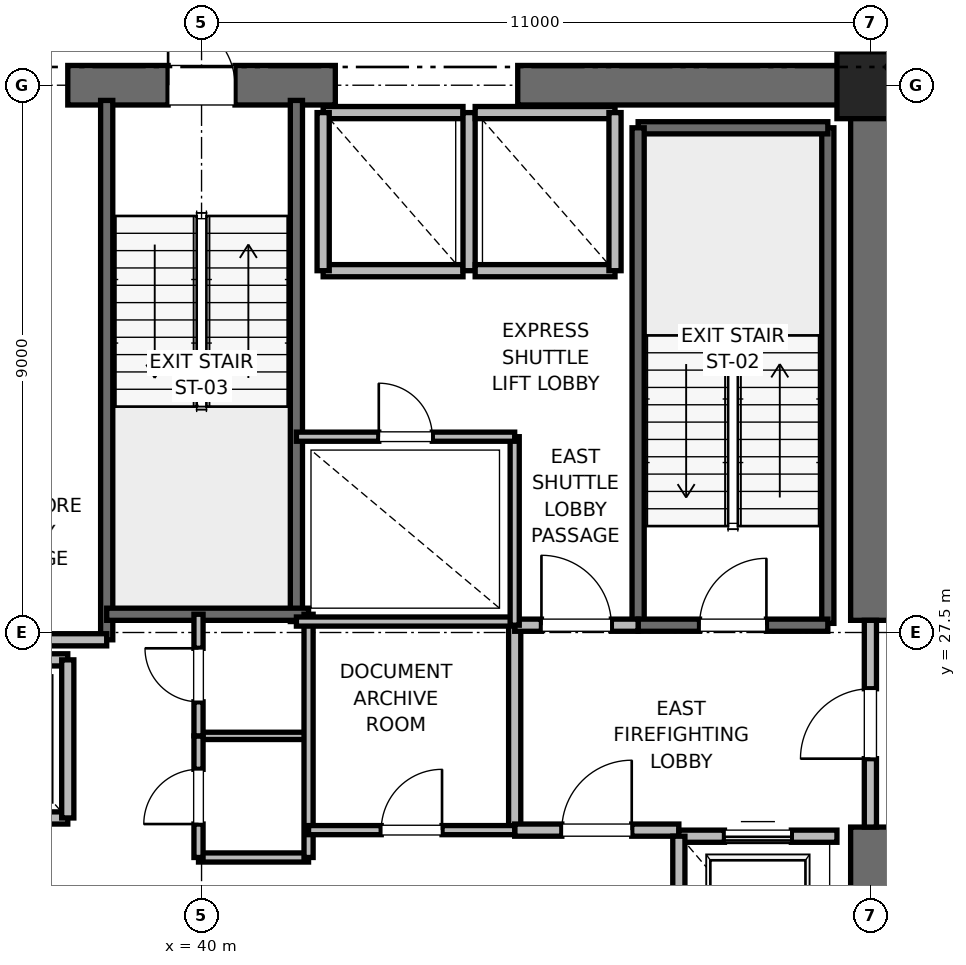
"""IFC4 building model, lengths in metres.
Left out: names, types, materials, properties, quantities, classifications, styles, units other than length and angle.
Written with IfcOpenShell. Run it as: python <this file> out.ifc"""

import sys

from ifc_helpers import new_model, si_unit, direction, frame, frame_2d, origin, origin_2d, place, context, subcontext, project, spatial, rectangle, extrude, element, fill, save


model = new_model("IFC4")
c1 = context("Model", 3, precision=1e-05, world=origin(), true_north=direction((0.0, 1.0)))
c2 = subcontext(c1, "Body", "Model", "MODEL_VIEW")
j1 = project(units=[si_unit("LENGTHUNIT", "METRE"), si_unit("PLANEANGLEUNIT", "RADIAN")], contexts=[c1])
p1 = place(None, origin())
s1 = spatial("IfcSite", under=j1, at=p1, CompositionType="ELEMENT")
p2 = place(p1, origin())
s2 = spatial("IfcBuilding", under=s1, at=p2, CompositionType="ELEMENT")
p3 = place(p2, frame((0.0, 0.0, 67.6)))
s3 = spatial("IfcBuildingStorey", under=s2, at=p3, CompositionType="ELEMENT", Elevation=67.6)
p4 = place(p3, frame((51.0, 36.5, 0.0), z_axis=(0.0, 0.0, 1.0), x_axis=(1.0, 0.0, 0.0)))
e1 = element("IfcColumn", 1, at=p4, inside=s3, PredefinedType="PILASTER", context=c2, shape_type="SweptSolid", body=[
    extrude(rectangle(XDim=1.1, YDim=1.1, at=origin_2d()), origin(), (0.0, 0.0, 1.0), 4.0),
])
p5 = place(p3, frame((37.8, 36.5, 0.0), z_axis=(0.0, 0.0, 1.0), x_axis=(1.0, 0.0, 0.0)))
e2 = element("IfcWall", 2, at=p5, inside=s3, PredefinedType="SHEAR", context=c2, shape_type="SweptSolid", body=[
    extrude(rectangle(XDim=4.4, YDim=0.65, at=frame_2d((2.2, 0.0))), origin(), (0.0, 0.0, 1.0), 3.76),
])
p6 = place(p5, frame((1.65, 0.0, 0.0)))
e3 = element("IfcOpeningElement", 3, at=p6, cuts=e2, PredefinedType="OPENING", context=c2, shape_type="SweptSolid", body=[
    extrude(rectangle(XDim=1.1, YDim=2.15, at=frame_2d((0.55, 1.075))), frame((0.0, 0.325, 0.0), z_axis=(0.0, -1.0, 0.0), x_axis=(1.0, 0.0, 0.0)), (0.0, 0.0, 1.0), 0.65),
])
for number, where, z_axis, x_axis in (
    (4, (45.2, 36.5, 0.0), (0.0, 0.0, 1.0), (1.0, 0.0, 0.0)),
    (5, (51.0, 18.5, 0.0), (0.0, 0.0, 1.0), (0.0, 1.0, 0.0)),
):
    element("IfcWall", number, at=place(p3, frame(where, z_axis=z_axis, x_axis=x_axis)), inside=s3, PredefinedType="SHEAR", context=c2, shape_type="SweptSolid", body=[
        extrude(rectangle(XDim=5.8, YDim=0.65, at=frame_2d((2.9, 0.0))), origin(), (0.0, 0.0, 1.0), 3.76),
    ])
p7 = place(p3, frame((51.0, 27.7, 0.0), z_axis=(0.0, 0.0, 1.0), x_axis=(0.0, 1.0, 0.0)))
e6 = element("IfcWall", 6, at=p7, inside=s3, PredefinedType="SHEAR", context=c2, shape_type="SweptSolid", body=[
    extrude(rectangle(XDim=8.8, YDim=0.65, at=frame_2d((4.4, 0.0))), origin(), (0.0, 0.0, 1.0), 3.76),
])
p8 = place(p3, frame((50.3, 27.65, 0.0), z_axis=(0.0, 0.0, 1.0), x_axis=(0.0, 1.0, 0.0)))
e7 = element("IfcWall", 7, at=p8, inside=s3, PredefinedType="SOLIDWALL", context=c2, shape_type="SweptSolid", body=[
    extrude(rectangle(XDim=8.15, YDim=0.2, at=frame_2d((4.075, 0.0))), origin(), (0.0, 0.0, 1.0), 3.76),
])
p9 = place(p3, frame((47.18, 35.8, 0.0), z_axis=(0.0, 0.0, 1.0), x_axis=(1.0, 0.0, 0.0)))
e8 = element("IfcWall", 8, at=p9, inside=s3, PredefinedType="SOLIDWALL", context=c2, shape_type="SweptSolid", body=[
    extrude(rectangle(XDim=3.12, YDim=0.2, at=frame_2d((1.56, 0.0))), origin(), (0.0, 0.0, 1.0), 3.76),
])
p10 = place(p3, frame((47.18, 27.62, 0.0), z_axis=(0.0, 0.0, 1.0), x_axis=(0.0, 1.0, 0.0)))
e9 = element("IfcWall", 9, at=p10, inside=s3, PredefinedType="SOLIDWALL", context=c2, shape_type="SweptSolid", body=[
    extrude(rectangle(XDim=8.18, YDim=0.2, at=frame_2d((4.09, 0.0))), origin(), (0.0, 0.0, 1.0), 3.76),
])
p11 = place(p3, frame((47.18, 27.62, 0.0), z_axis=(0.0, 0.0, 1.0), x_axis=(1.0, 0.0, 0.0)))
e10 = element("IfcWall", 10, at=p11, inside=s3, PredefinedType="SOLIDWALL", context=c2, shape_type="SweptSolid", body=[
    extrude(rectangle(XDim=3.12, YDim=0.2, at=frame_2d((1.56, 0.0))), origin(), (0.0, 0.0, 1.0), 3.76),
])
p12 = place(p11, frame((1.01, 0.0, 0.0)))
e11 = element("IfcOpeningElement", 11, at=p12, cuts=e10, PredefinedType="OPENING", context=c2, shape_type="SweptSolid", body=[
    extrude(rectangle(XDim=1.1, YDim=2.15, at=frame_2d((0.55, 1.075))), frame((0.0, 0.1, 0.0), z_axis=(0.0, -1.0, 0.0), x_axis=(1.0, 0.0, 0.0)), (0.0, 0.0, 1.0), 0.2),
])
p13 = place(p3, frame((38.44, 27.38, 0.0), z_axis=(0.0, 0.0, 1.0), x_axis=(0.0, 1.0, 0.0)))
e12 = element("IfcWall", 12, at=p13, inside=s3, PredefinedType="SOLIDWALL", context=c2, shape_type="SweptSolid", body=[
    extrude(rectangle(XDim=8.87, YDim=0.2, at=frame_2d((4.435, 0.0))), origin(), (0.0, 0.0, 1.0), 3.76),
])
p14 = place(p3, frame((41.56, 27.68, 0.0), z_axis=(0.0, 0.0, 1.0), x_axis=(0.0, 1.0, 0.0)))
e13 = element("IfcWall", 13, at=p14, inside=s3, PredefinedType="SOLIDWALL", context=c2, shape_type="SweptSolid", body=[
    extrude(rectangle(XDim=8.57, YDim=0.2, at=frame_2d((4.285, 0.0))), origin(), (0.0, 0.0, 1.0), 3.76),
])
p15 = place(p3, frame((38.44, 27.8, 0.0), z_axis=(0.0, 0.0, 1.0), x_axis=(1.0, 0.0, 0.0)))
e14 = element("IfcWall", 14, at=p15, inside=s3, PredefinedType="SOLIDWALL", context=c2, shape_type="SweptSolid", body=[
    extrude(rectangle(XDim=3.32, YDim=0.2, at=frame_2d((1.66, 0.0))), origin(), (0.0, 0.0, 1.0), 3.76),
])
p16 = place(p3, frame((32.82, 27.38, 0.0), z_axis=(0.0, 0.0, 1.0), x_axis=(1.0, 0.0, 0.0)))
e15 = element("IfcWall", 15, at=p16, inside=s3, PredefinedType="PARTITIONING", context=c2, shape_type="SweptSolid", body=[
    extrude(rectangle(XDim=5.62, YDim=0.2, at=frame_2d((2.81, 0.0))), origin(), (0.0, 0.0, 1.0), 3.76),
])
p17 = place(p3, frame((45.15, 24.25, 0.0), z_axis=(0.0, 0.0, 1.0), x_axis=(0.0, 1.0, 0.0)))
e16 = element("IfcWall", 16, at=p17, inside=s3, PredefinedType="PARTITIONING", context=c2, shape_type="SweptSolid", body=[
    extrude(rectangle(XDim=3.37, YDim=0.2, at=frame_2d((1.685, 0.0))), origin(), (0.0, 0.0, 1.0), 3.76),
])
p18 = place(p3, frame((45.15, 24.25, 0.0), z_axis=(0.0, 0.0, 1.0), x_axis=(1.0, 0.0, 0.0)))
e17 = element("IfcWall", 17, at=p18, inside=s3, PredefinedType="PARTITIONING", context=c2, shape_type="SweptSolid", body=[
    extrude(rectangle(XDim=2.7, YDim=0.2, at=frame_2d((1.35, 0.0))), origin(), (0.0, 0.0, 1.0), 3.76),
])
p19 = place(p18, frame((0.775, 0.0, 0.0)))
e18 = element("IfcOpeningElement", 18, at=p19, cuts=e17, PredefinedType="OPENING", context=c2, shape_type="SweptSolid", body=[
    extrude(rectangle(XDim=1.15, YDim=2.2, at=frame_2d((0.575, 1.1))), frame((0.0, 0.1, 0.0), z_axis=(0.0, -1.0, 0.0), x_axis=(1.0, 0.0, 0.0)), (0.0, 0.0, 1.0), 0.2),
])
p20 = place(p3, frame((45.15, 27.62, 0.0), z_axis=(0.0, 0.0, 1.0), x_axis=(1.0, 0.0, 0.0)))
e19 = element("IfcWall", 19, at=p20, inside=s3, PredefinedType="PARTITIONING", context=c2, shape_type="SweptSolid", body=[
    extrude(rectangle(XDim=2.03, YDim=0.2, at=frame_2d((1.015, 0.0))), origin(), (0.0, 0.0, 1.0), 3.76),
])
p21 = place(p20, frame((0.44, 0.0, 0.0)))
e20 = element("IfcOpeningElement", 20, at=p21, cuts=e19, PredefinedType="OPENING", context=c2, shape_type="SweptSolid", body=[
    extrude(rectangle(XDim=1.15, YDim=2.2, at=frame_2d((0.575, 1.1))), frame((0.0, 0.1, 0.0), z_axis=(0.0, -1.0, 0.0), x_axis=(1.0, 0.0, 0.0)), (0.0, 0.0, 1.0), 0.2),
])
p22 = place(p3, frame((51.0, 24.3, 0.0), z_axis=(0.0, 0.0, 1.0), x_axis=(0.0, 1.0, 0.0)))
e21 = element("IfcWall", 21, at=p22, inside=s3, PredefinedType="PARTITIONING", context=c2, shape_type="SweptSolid", body=[
    extrude(rectangle(XDim=3.4, YDim=0.2, at=frame_2d((1.7, 0.0))), origin(), (0.0, 0.0, 1.0), 2.54),
])
p23 = place(p22, frame((1.125, 0.0, 0.0)))
e22 = element("IfcOpeningElement", 22, at=p23, cuts=e21, PredefinedType="OPENING", context=c2, shape_type="SweptSolid", body=[
    extrude(rectangle(XDim=1.15, YDim=2.2, at=frame_2d((0.575, 1.1))), frame((0.0, 0.1, 0.0), z_axis=(0.0, -1.0, 0.0), x_axis=(1.0, 0.0, 0.0)), (0.0, 0.0, 1.0), 0.2),
])
p24 = place(p3, frame((50.45, 24.15, 0.0), z_axis=(0.0, 0.0, 1.0), x_axis=(-1.0, 0.0, 0.0)))
e23 = element("IfcWall", 23, at=p24, inside=s3, PredefinedType="SOLIDWALL", context=c2, shape_type="SweptSolid", body=[
    extrude(rectangle(XDim=2.6, YDim=0.2, at=frame_2d((1.3, 0.0))), origin(), (0.0, 0.0, 1.0), 2.54),
])
p25 = place(p24, frame((0.75, 0.0, 0.0)))
e24 = element("IfcOpeningElement", 24, at=p25, cuts=e23, PredefinedType="OPENING", context=c2, shape_type="SweptSolid", body=[
    extrude(rectangle(XDim=1.1, YDim=2.2, at=frame_2d((0.55, 1.1))), frame((0.0, 0.1, 0.0), z_axis=(0.0, -1.0, 0.0), x_axis=(1.0, 0.0, 0.0)), (0.0, 0.0, 1.0), 0.2),
])
p26 = place(p3, frame((47.85, 24.15, 0.0), z_axis=(0.0, 0.0, 1.0), x_axis=(0.0, -1.0, 0.0)))
e25 = element("IfcWall", 25, at=p26, inside=s3, PredefinedType="SOLIDWALL", context=c2, shape_type="SweptSolid", body=[
    extrude(rectangle(XDim=3.0, YDim=0.2, at=frame_2d((1.5, 0.0))), origin(), (0.0, 0.0, 1.0), 3.76),
])
p27 = place(p3, frame((35.5, 24.45, 0.0), z_axis=(0.0, 0.0, 1.0), x_axis=(1.0, 0.0, 0.0)))
e26 = element("IfcWall", 26, at=p27, inside=s3, PredefinedType="SOLIDWALL", context=c2, shape_type="SweptSolid", body=[
    extrude(rectangle(XDim=2.3, YDim=0.2, at=frame_2d((1.15, 0.0))), origin(), (0.0, 0.0, 1.0), 3.76),
])
p28 = place(p27, frame((0.6, 0.0, 0.0)))
e27 = element("IfcOpeningElement", 27, at=p28, cuts=e26, PredefinedType="OPENING", context=c2, shape_type="SweptSolid", body=[
    extrude(rectangle(XDim=1.1, YDim=2.2, at=frame_2d((0.55, 1.1))), frame((0.0, 0.1, 0.0), z_axis=(0.0, -1.0, 0.0), x_axis=(1.0, 0.0, 0.0)), (0.0, 0.0, 1.0), 0.2),
])
p29 = place(p3, frame((37.8, 27.05, 0.0), z_axis=(0.0, 0.0, 1.0), x_axis=(-1.0, 0.0, 0.0)))
e28 = element("IfcWall", 28, at=p29, inside=s3, PredefinedType="SOLIDWALL", context=c2, shape_type="SweptSolid", body=[
    extrude(rectangle(XDim=2.3, YDim=0.2, at=frame_2d((1.15, 0.0))), origin(), (0.0, 0.0, 1.0), 3.76),
])
p30 = place(p3, frame((37.8, 24.45, 0.0), z_axis=(0.0, 0.0, 1.0), x_axis=(0.0, 1.0, 0.0)))
e29 = element("IfcWall", 29, at=p30, inside=s3, PredefinedType="SOLIDWALL", context=c2, shape_type="SweptSolid", body=[
    extrude(rectangle(XDim=2.6, YDim=0.2, at=frame_2d((1.3, 0.0))), origin(), (0.0, 0.0, 1.0), 3.76),
])
p31 = place(p3, frame((42.0, 33.45, 0.0), z_axis=(0.0, 0.0, 1.0), x_axis=(1.0, 0.0, 0.0)))
e30 = element("IfcWall", 30, at=p31, inside=s3, PredefinedType="SOLIDWALL", context=c2, shape_type="SweptSolid", body=[
    extrude(rectangle(XDim=2.3, YDim=0.2, at=frame_2d((1.15, 0.0))), origin(), (0.0, 0.0, 1.0), 3.76),
])
p32 = place(p3, frame((44.3, 36.05, 0.0), z_axis=(0.0, 0.0, 1.0), x_axis=(-1.0, 0.0, 0.0)))
e31 = element("IfcWall", 31, at=p32, inside=s3, PredefinedType="SOLIDWALL", context=c2, shape_type="SweptSolid", body=[
    extrude(rectangle(XDim=2.3, YDim=0.2, at=frame_2d((1.15, 0.0))), origin(), (0.0, 0.0, 1.0), 2.54),
])
for number, where, z_axis, x_axis in (
    (32, (42.0, 36.05, 0.0), (0.0, 0.0, 1.0), (0.0, -1.0, 0.0)),
    (33, (44.4, 33.45, 0.0), (0.0, 0.0, 1.0), (0.0, 1.0, 0.0)),
):
    element("IfcWall", number, at=place(p3, frame(where, z_axis=z_axis, x_axis=x_axis)), inside=s3, PredefinedType="SOLIDWALL", context=c2, shape_type="SweptSolid", body=[
        extrude(rectangle(XDim=2.6, YDim=0.2, at=frame_2d((1.3, 0.0))), origin(), (0.0, 0.0, 1.0), 2.54),
    ])
p33 = place(p3, frame((44.5, 33.45, 0.0), z_axis=(0.0, 0.0, 1.0), x_axis=(1.0, 0.0, 0.0)))
e34 = element("IfcWall", 34, at=p33, inside=s3, PredefinedType="SOLIDWALL", context=c2, shape_type="SweptSolid", body=[
    extrude(rectangle(XDim=2.3, YDim=0.2, at=frame_2d((1.15, 0.0))), origin(), (0.0, 0.0, 1.0), 3.76),
])
p34 = place(p3, frame((46.8, 36.05, 0.0), z_axis=(0.0, 0.0, 1.0), x_axis=(-1.0, 0.0, 0.0)))
e35 = element("IfcWall", 35, at=p34, inside=s3, PredefinedType="SOLIDWALL", context=c2, shape_type="SweptSolid", body=[
    extrude(rectangle(XDim=2.3, YDim=0.2, at=frame_2d((1.15, 0.0))), origin(), (0.0, 0.0, 1.0), 2.54),
])
p35 = place(p3, frame((46.8, 33.45, 0.0), z_axis=(0.0, 0.0, 1.0), x_axis=(0.0, 1.0, 0.0)))
e36 = element("IfcWall", 36, at=p35, inside=s3, PredefinedType="SOLIDWALL", context=c2, shape_type="SweptSolid", body=[
    extrude(rectangle(XDim=2.6, YDim=0.2, at=frame_2d((1.3, 0.0))), origin(), (0.0, 0.0, 1.0), 3.76),
])
p36 = place(p3, frame((39.95, 23.8, 0.0), z_axis=(0.0, 0.0, 1.0), x_axis=(1.0, 0.0, 0.0)))
e37 = element("IfcWall", 37, at=p36, inside=s3, PredefinedType="PARTITIONING", context=c2, shape_type="SweptSolid", body=[
    extrude(rectangle(XDim=1.81, YDim=0.15, at=frame_2d((0.905, 0.0))), origin(), (0.0, 0.0, 1.0), 2.85),
])
p37 = place(p3, frame((39.95, 25.8, 0.0), z_axis=(0.0, 0.0, 1.0), x_axis=(1.0, 0.0, 0.0)))
e38 = element("IfcWall", 38, at=p37, inside=s3, PredefinedType="PARTITIONING", context=c2, shape_type="SweptSolid", body=[
    extrude(rectangle(XDim=1.81, YDim=0.12, at=frame_2d((0.905, 0.0))), origin(), (0.0, 0.0, 1.0), 2.85),
])
p38 = place(p3, frame((41.76, 23.8, 0.0), z_axis=(0.0, 0.0, 1.0), x_axis=(0.0, 1.0, 0.0)))
e39 = element("IfcWall", 39, at=p38, inside=s3, PredefinedType="PARTITIONING", context=c2, shape_type="SweptSolid", body=[
    extrude(rectangle(XDim=4.0, YDim=0.15, at=frame_2d((2.0, 0.0))), origin(), (0.0, 0.0, 1.0), 2.85),
])
p39 = place(p3, frame((39.95, 23.8, 0.0), z_axis=(0.0, 0.0, 1.0), x_axis=(0.0, 1.0, 0.0)))
e40 = element("IfcWall", 40, at=p39, inside=s3, PredefinedType="PARTITIONING", context=c2, shape_type="SweptSolid", body=[
    extrude(rectangle(XDim=2.0, YDim=0.15, at=frame_2d((1.0, 0.0))), origin(), (0.0, 0.0, 1.0), 2.85),
])
p40 = place(p39, frame((0.55, 0.0, 0.0)))
e41 = element("IfcOpeningElement", 41, at=p40, cuts=e40, PredefinedType="OPENING", context=c2, shape_type="SweptSolid", body=[
    extrude(rectangle(XDim=0.9, YDim=2.1, at=frame_2d((0.45, 1.05))), frame((0.0, 0.075, 0.0), z_axis=(0.0, -1.0, 0.0), x_axis=(1.0, 0.0, 0.0)), (0.0, 0.0, 1.0), 0.15),
])
p41 = place(p3, frame((39.95, 25.8, 0.0), z_axis=(0.0, 0.0, 1.0), x_axis=(0.0, 1.0, 0.0)))
e42 = element("IfcWall", 42, at=p41, inside=s3, PredefinedType="PARTITIONING", context=c2, shape_type="SweptSolid", body=[
    extrude(rectangle(XDim=2.0, YDim=0.15, at=frame_2d((1.0, 0.0))), origin(), (0.0, 0.0, 1.0), 2.85),
])
p42 = place(p41, frame((0.56, 0.0, 0.0)))
e43 = element("IfcOpeningElement", 43, at=p42, cuts=e42, PredefinedType="OPENING", context=c2, shape_type="SweptSolid", body=[
    extrude(rectangle(XDim=0.88, YDim=2.1, at=frame_2d((0.44, 1.05))), frame((0.0, 0.075, 0.0), z_axis=(0.0, -1.0, 0.0), x_axis=(1.0, 0.0, 0.0)), (0.0, 0.0, 1.0), 0.15),
])
p43 = place(p3, frame((41.56, 27.68, 0.0), z_axis=(0.0, 0.0, 1.0), x_axis=(1.0, 0.0, 0.0)))
e44 = element("IfcWall", 44, at=p43, inside=s3, PredefinedType="PARTITIONING", context=c2, shape_type="SweptSolid", body=[
    extrude(rectangle(XDim=3.59, YDim=0.15, at=frame_2d((1.795, 0.0))), origin(), (0.0, 0.0, 1.0), 2.85),
])
p44 = place(p3, frame((41.76, 24.25, 0.0), z_axis=(0.0, 0.0, 1.0), x_axis=(1.0, 0.0, 0.0)))
e45 = element("IfcWall", 45, at=p44, inside=s3, PredefinedType="PARTITIONING", context=c2, shape_type="SweptSolid", body=[
    extrude(rectangle(XDim=3.39, YDim=0.15, at=frame_2d((1.695, 0.0))), origin(), (0.0, 0.0, 1.0), 2.85),
])
p45 = place(p44, frame((1.195, 0.0, 0.0)))
e46 = element("IfcOpeningElement", 46, at=p45, cuts=e45, PredefinedType="OPENING", context=c2, shape_type="SweptSolid", body=[
    extrude(rectangle(XDim=1.0, YDim=2.15, at=frame_2d((0.5, 1.075))), frame((0.0, 0.075, 0.0), z_axis=(0.0, -1.0, 0.0), x_axis=(1.0, 0.0, 0.0)), (0.0, 0.0, 1.0), 0.15),
])
p46 = place(p3, frame((45.15, 27.62, 0.0), z_axis=(0.0, 0.0, 1.0), x_axis=(0.0, 1.0, 0.0)))
e47 = element("IfcWall", 47, at=p46, inside=s3, PredefinedType="PARTITIONING", context=c2, shape_type="SweptSolid", body=[
    extrude(rectangle(XDim=3.1, YDim=0.15, at=frame_2d((1.55, 0.0))), origin(), (0.0, 0.0, 1.0), 2.85),
])
p47 = place(p3, frame((41.56, 30.72, 0.0), z_axis=(0.0, 0.0, 1.0), x_axis=(1.0, 0.0, 0.0)))
e48 = element("IfcWall", 48, at=p47, inside=s3, PredefinedType="PARTITIONING", context=c2, shape_type="SweptSolid", body=[
    extrude(rectangle(XDim=3.59, YDim=0.15, at=frame_2d((1.795, 0.0))), origin(), (0.0, 0.0, 1.0), 2.85),
])
p48 = place(p47, frame((1.355, 0.0, 0.0)))
e49 = element("IfcOpeningElement", 49, at=p48, cuts=e48, PredefinedType="OPENING", context=c2, shape_type="SweptSolid", body=[
    extrude(rectangle(XDim=0.88, YDim=2.1, at=frame_2d((0.44, 1.05))), frame((0.0, 0.075, 0.0), z_axis=(0.0, -1.0, 0.0), x_axis=(1.0, 0.0, 0.0)), (0.0, 0.0, 1.0), 0.15),
])
p49 = place(p12, origin())
e50 = element("IfcDoor", 50, at=p49, inside=s3, OperationType="SINGLE_SWING_RIGHT", PredefinedType="DOOR", context=c2, shape_type="SweptSolid", body=[
    extrude(rectangle(XDim=1.1, YDim=2.15, at=frame_2d((0.55, 1.075))), frame((0.0, 0.025, 0.0), z_axis=(0.0, -1.0, 0.0), x_axis=(1.0, 0.0, 0.0)), (0.0, 0.0, 1.0), 0.05),
])
fill(e11, e50)
p50 = place(p6, origin())
e51 = element("IfcDoor", 51, at=p50, inside=s3, OperationType="SINGLE_SWING_LEFT", PredefinedType="DOOR", context=c2, shape_type="SweptSolid", body=[
    extrude(rectangle(XDim=1.1, YDim=2.15, at=frame_2d((0.55, 1.075))), frame((0.0, 0.025, 0.0), z_axis=(0.0, -1.0, 0.0), x_axis=(1.0, 0.0, 0.0)), (0.0, 0.0, 1.0), 0.05),
])
fill(e3, e51)
p51 = place(p19, origin())
e52 = element("IfcDoor", 52, at=p51, inside=s3, OperationType="SINGLE_SWING_RIGHT", PredefinedType="DOOR", context=c2, shape_type="SweptSolid", body=[
    extrude(rectangle(XDim=1.15, YDim=2.2, at=frame_2d((0.575, 1.1))), frame((0.0, 0.025, 0.0), z_axis=(0.0, -1.0, 0.0), x_axis=(1.0, 0.0, 0.0)), (0.0, 0.0, 1.0), 0.05),
])
fill(e18, e52)
p52 = place(p21, origin())
e53 = element("IfcDoor", 53, at=p52, inside=s3, OperationType="SINGLE_SWING_LEFT", PredefinedType="DOOR", context=c2, shape_type="SweptSolid", body=[
    extrude(rectangle(XDim=1.15, YDim=2.2, at=frame_2d((0.575, 1.1))), frame((0.0, 0.025, 0.0), z_axis=(0.0, -1.0, 0.0), x_axis=(1.0, 0.0, 0.0)), (0.0, 0.0, 1.0), 0.05),
])
fill(e20, e53)
p53 = place(p23, origin())
e54 = element("IfcDoor", 54, at=p53, inside=s3, OperationType="SINGLE_SWING_LEFT", PredefinedType="DOOR", context=c2, shape_type="SweptSolid", body=[
    extrude(rectangle(XDim=1.15, YDim=2.2, at=frame_2d((0.575, 1.1))), frame((0.0, 0.025, 0.0), z_axis=(0.0, -1.0, 0.0), x_axis=(1.0, 0.0, 0.0)), (0.0, 0.0, 1.0), 0.05),
])
fill(e22, e54)
p54 = place(p25, origin())
e55 = element("IfcDoor", 55, at=p54, inside=s3, OperationType="SLIDING_TO_RIGHT", PredefinedType="DOOR", context=c2, shape_type="SweptSolid", body=[
    extrude(rectangle(XDim=1.1, YDim=2.2, at=frame_2d((0.55, 1.1))), frame((0.0, 0.025, 0.0), z_axis=(0.0, -1.0, 0.0), x_axis=(1.0, 0.0, 0.0)), (0.0, 0.0, 1.0), 0.05),
])
fill(e24, e55)
p55 = place(p40, origin())
e56 = element("IfcDoor", 56, at=p55, inside=s3, OperationType="SINGLE_SWING_LEFT", PredefinedType="DOOR", context=c2, shape_type="SweptSolid", body=[
    extrude(rectangle(XDim=0.9, YDim=2.1, at=frame_2d((0.45, 1.05))), frame((0.0, 0.025, 0.0), z_axis=(0.0, -1.0, 0.0), x_axis=(1.0, 0.0, 0.0)), (0.0, 0.0, 1.0), 0.05),
])
fill(e41, e56)
p56 = place(p42, origin())
e57 = element("IfcDoor", 57, at=p56, inside=s3, OperationType="SINGLE_SWING_RIGHT", PredefinedType="DOOR", context=c2, shape_type="SweptSolid", body=[
    extrude(rectangle(XDim=0.88, YDim=2.1, at=frame_2d((0.44, 1.05))), frame((0.0, 0.025, 0.0), z_axis=(0.0, -1.0, 0.0), x_axis=(1.0, 0.0, 0.0)), (0.0, 0.0, 1.0), 0.05),
])
fill(e43, e57)
p57 = place(p45, origin())
e58 = element("IfcDoor", 58, at=p57, inside=s3, OperationType="SINGLE_SWING_RIGHT", PredefinedType="DOOR", context=c2, shape_type="SweptSolid", body=[
    extrude(rectangle(XDim=1.0, YDim=2.15, at=frame_2d((0.5, 1.075))), frame((0.0, 0.025, 0.0), z_axis=(0.0, -1.0, 0.0), x_axis=(1.0, 0.0, 0.0)), (0.0, 0.0, 1.0), 0.05),
])
fill(e46, e58)
p58 = place(p48, origin())
e59 = element("IfcDoor", 59, at=p58, inside=s3, OperationType="SINGLE_SWING_LEFT", PredefinedType="DOOR", context=c2, shape_type="SweptSolid", body=[
    extrude(rectangle(XDim=0.88, YDim=2.1, at=frame_2d((0.44, 1.05))), frame((0.0, 0.025, 0.0), z_axis=(0.0, -1.0, 0.0), x_axis=(1.0, 0.0, 0.0)), (0.0, 0.0, 1.0), 0.05),
])
fill(e49, e59)
save(model, sys.argv[1])
